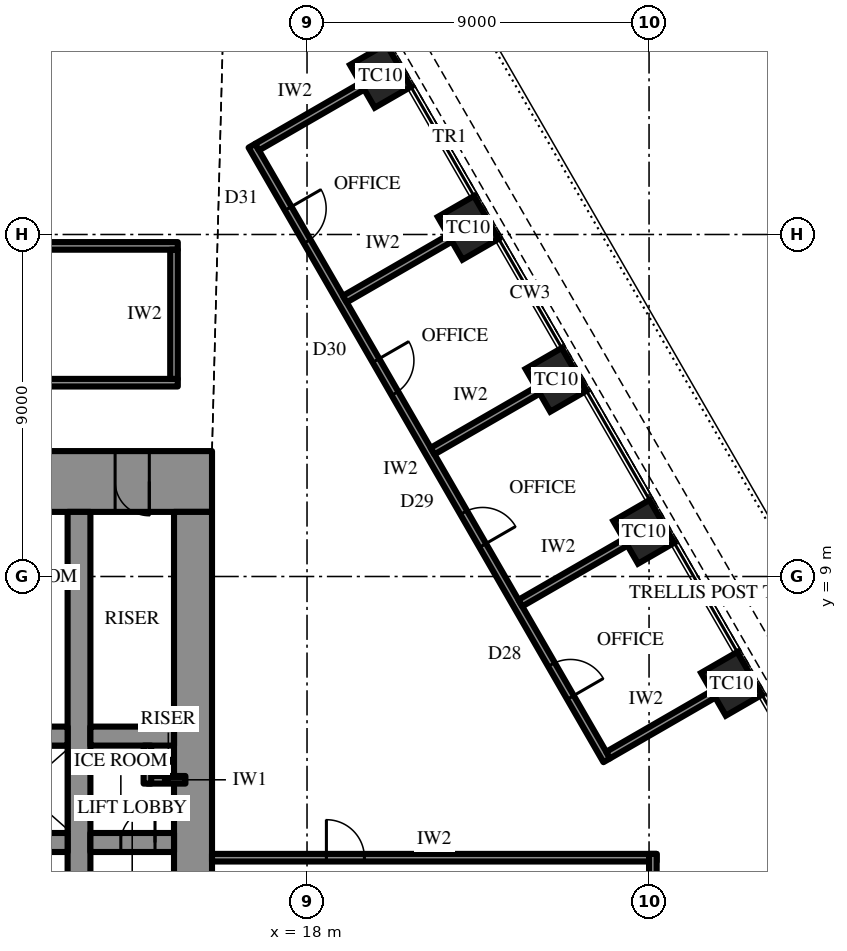
"""IFC4 building model, lengths in metres.
Left out: names, types, materials, properties, quantities, classifications, styles, units other than length and angle.
Written with IfcOpenShell. Run it as: python <this file> out.ifc"""

import sys

from ifc_helpers import new_model, si_unit, direction, frame, frame_2d, origin, origin_2d, place, context, subcontext, project, spatial, rectangle, extrude, element, fill, save


model = new_model("IFC4")
c1 = context("Model", 3, precision=1e-05, world=origin(), true_north=direction((0.0, 1.0)))
c2 = subcontext(c1, "Body", "Model", "MODEL_VIEW")
j1 = project(units=[si_unit("LENGTHUNIT", "METRE"), si_unit("PLANEANGLEUNIT", "RADIAN")], contexts=[c1])
p1 = place(None, origin())
s1 = spatial("IfcSite", under=j1, at=p1, CompositionType="ELEMENT")
p2 = place(p1, origin())
s2 = spatial("IfcBuilding", under=s1, at=p2, CompositionType="ELEMENT")
p3 = place(p2, frame((0.0, 0.0, 236.5)))
s3 = spatial("IfcBuildingStorey", under=s2, at=p3, CompositionType="ELEMENT", Elevation=236.5)
for number, where, z_axis, x_axis in (
    (1, (29.171, 6.175, 0.0), (0.0, 0.0, 1.0), (-0.5, 0.866, 0.0)),
    (2, (26.861, 10.175, 0.0), (0.0, 0.0, 1.0), (-0.5, 0.866, 0.0)),
    (3, (24.552, 14.175, 0.0), (0.0, 0.0, 1.0), (-0.5, 0.866, 0.0)),
    (4, (22.242, 18.175, 0.0), (0.0, 0.0, 1.0), (-0.5, 0.866, 0.0)),
    (5, (19.933, 22.175, 0.0), (0.0, 0.0, 1.0), (-0.5, 0.866, 0.0)),
):
    element("IfcColumn", number, at=place(p3, frame(where, z_axis=z_axis, x_axis=x_axis)), inside=s3, PredefinedType="COLUMN", context=c2, shape_type="SweptSolid", body=[
        extrude(rectangle(XDim=1.3, YDim=1.1, at=origin_2d()), origin(), (0.0, 0.0, 1.0), 4.2),
    ])
p4 = place(p3, frame((-15.5, 11.5, 0.0), z_axis=(0.0, 0.0, 1.0), x_axis=(1.0, 0.0, 0.0)))
e6 = element("IfcWall", 6, at=p4, inside=s3, PredefinedType="SHEAR", context=c2, shape_type="SweptSolid", body=[
    extrude(rectangle(XDim=31.0, YDim=1.6, at=frame_2d((15.5, 0.0))), origin(), (0.0, 0.0, 1.0), 4.2),
])
p5 = place(p4, frame((16.35, 0.0, 0.0)))
e7 = element("IfcOpeningElement", 7, at=p5, cuts=e6, PredefinedType="OPENING", context=c2, shape_type="SweptSolid", body=[
    extrude(rectangle(XDim=0.9, YDim=2.2, at=frame_2d((0.45, 1.1))), frame((0.0, 0.81, 0.0), z_axis=(0.0, -1.0, 0.0), x_axis=(1.0, 0.0, 0.0)), (0.0, 0.0, 1.0), 1.62),
])
p6 = place(p4, frame((19.35, 0.0, 0.0)))
e8 = element("IfcOpeningElement", 8, at=p6, cuts=e6, PredefinedType="OPENING", context=c2, shape_type="SweptSolid", body=[
    extrude(rectangle(XDim=0.9, YDim=2.2, at=frame_2d((0.45, 1.1))), frame((0.0, 0.81, 0.0), z_axis=(0.0, -1.0, 0.0), x_axis=(1.0, 0.0, 0.0)), (0.0, 0.0, 1.0), 1.62),
])
p7 = place(p4, frame((22.4, 0.0, 0.0)))
e9 = element("IfcOpeningElement", 9, at=p7, cuts=e6, PredefinedType="OPENING", context=c2, shape_type="SweptSolid", body=[
    extrude(rectangle(XDim=1.0, YDim=2.2, at=frame_2d((0.5, 1.1))), frame((0.0, 0.81, 0.0), z_axis=(0.0, -1.0, 0.0), x_axis=(1.0, 0.0, 0.0)), (0.0, 0.0, 1.0), 1.62),
])
p8 = place(p4, frame((1.65, 0.0, 0.0)))
e10 = element("IfcOpeningElement", 10, at=p8, cuts=e6, PredefinedType="OPENING", context=c2, shape_type="SweptSolid", body=[
    extrude(rectangle(XDim=0.9, YDim=2.2, at=frame_2d((0.45, 1.1))), frame((0.0, 0.81, 0.0), z_axis=(0.0, -1.0, 0.0), x_axis=(1.0, 0.0, 0.0)), (0.0, 0.0, 1.0), 1.62),
])
p9 = place(p4, frame((4.65, 0.0, 0.0)))
e11 = element("IfcOpeningElement", 11, at=p9, cuts=e6, PredefinedType="OPENING", context=c2, shape_type="SweptSolid", body=[
    extrude(rectangle(XDim=0.9, YDim=2.2, at=frame_2d((0.45, 1.1))), frame((0.0, 0.81, 0.0), z_axis=(0.0, -1.0, 0.0), x_axis=(1.0, 0.0, 0.0)), (0.0, 0.0, 1.0), 1.62),
])
p10 = place(p4, frame((25.45, 0.0, 0.0)))
e12 = element("IfcOpeningElement", 12, at=p10, cuts=e6, PredefinedType="OPENING", context=c2, shape_type="SweptSolid", body=[
    extrude(rectangle(XDim=0.9, YDim=2.2, at=frame_2d((0.45, 1.1))), frame((0.0, 0.81, 0.0), z_axis=(0.0, -1.0, 0.0), x_axis=(1.0, 0.0, 0.0)), (0.0, 0.0, 1.0), 1.62),
])
p11 = place(p4, frame((28.45, 0.0, 0.0)))
e13 = element("IfcOpeningElement", 13, at=p11, cuts=e6, PredefinedType="OPENING", context=c2, shape_type="SweptSolid", body=[
    extrude(rectangle(XDim=0.9, YDim=2.2, at=frame_2d((0.45, 1.1))), frame((0.0, 0.81, 0.0), z_axis=(0.0, -1.0, 0.0), x_axis=(1.0, 0.0, 0.0)), (0.0, 0.0, 1.0), 1.62),
])
p12 = place(p3, frame((15.0, -10.7, 0.0), z_axis=(0.0, 0.0, 1.0), x_axis=(0.0, 1.0, 0.0)))
e14 = element("IfcWall", 14, at=p12, inside=s3, PredefinedType="SHEAR", context=c2, shape_type="SweptSolid", body=[
    extrude(rectangle(XDim=21.4, YDim=1.0, at=frame_2d((10.7, 0.0))), origin(), (0.0, 0.0, 1.0), 4.2),
])
p13 = place(p12, frame((9.8, 0.0, 0.0)))
e15 = element("IfcOpeningElement", 15, at=p13, cuts=e14, PredefinedType="OPENING", context=c2, shape_type="SweptSolid", body=[
    extrude(rectangle(XDim=1.8, YDim=2.4, at=frame_2d((0.9, 1.2))), frame((0.0, 0.51, 0.0), z_axis=(0.0, -1.0, 0.0), x_axis=(1.0, 0.0, 0.0)), (0.0, 0.0, 1.0), 1.02),
])
p14 = place(p3, frame((12.0, -10.7, 0.0), z_axis=(0.0, 0.0, 1.0), x_axis=(0.0, 1.0, 0.0)))
e16 = element("IfcWall", 16, at=p14, inside=s3, PredefinedType="SHEAR", context=c2, shape_type="SweptSolid", body=[
    extrude(rectangle(XDim=21.4, YDim=0.6, at=frame_2d((10.7, 0.0))), origin(), (0.0, 0.0, 1.0), 4.2),
])
p15 = place(p14, frame((9.8, 0.0, 0.0)))
e17 = element("IfcOpeningElement", 17, at=p15, cuts=e16, PredefinedType="OPENING", context=c2, shape_type="SweptSolid", body=[
    extrude(rectangle(XDim=1.8, YDim=2.4, at=frame_2d((0.9, 1.2))), frame((0.0, 0.31, 0.0), z_axis=(0.0, -1.0, 0.0), x_axis=(1.0, 0.0, 0.0)), (0.0, 0.0, 1.0), 0.62),
])
p16 = place(p3, frame((-3.2, 2.0, 0.0), z_axis=(0.0, 0.0, 1.0), x_axis=(1.0, 0.0, 0.0)))
e18 = element("IfcWall", 18, at=p16, inside=s3, PredefinedType="SHEAR", context=c2, shape_type="SweptSolid", body=[
    extrude(rectangle(XDim=14.9, YDim=0.5, at=frame_2d((7.45, 0.0))), origin(), (0.0, 0.0, 1.0), 4.2),
])
p17 = place(p16, frame((1.15, 0.0, 0.0)))
e19 = element("IfcOpeningElement", 19, at=p17, cuts=e18, PredefinedType="OPENING", context=c2, shape_type="SweptSolid", body=[
    extrude(rectangle(XDim=1.1, YDim=2.2, at=frame_2d((0.55, 1.1))), frame((0.0, 0.26, 0.0), z_axis=(0.0, -1.0, 0.0), x_axis=(1.0, 0.0, 0.0)), (0.0, 0.0, 1.0), 0.52),
])
p18 = place(p16, frame((4.15, 0.0, 0.0)))
e20 = element("IfcOpeningElement", 20, at=p18, cuts=e18, PredefinedType="OPENING", context=c2, shape_type="SweptSolid", body=[
    extrude(rectangle(XDim=1.1, YDim=2.2, at=frame_2d((0.55, 1.1))), frame((0.0, 0.26, 0.0), z_axis=(0.0, -1.0, 0.0), x_axis=(1.0, 0.0, 0.0)), (0.0, 0.0, 1.0), 0.52),
])
p19 = place(p16, frame((7.15, 0.0, 0.0)))
e21 = element("IfcOpeningElement", 21, at=p19, cuts=e18, PredefinedType="OPENING", context=c2, shape_type="SweptSolid", body=[
    extrude(rectangle(XDim=1.1, YDim=2.2, at=frame_2d((0.55, 1.1))), frame((0.0, 0.26, 0.0), z_axis=(0.0, -1.0, 0.0), x_axis=(1.0, 0.0, 0.0)), (0.0, 0.0, 1.0), 0.52),
])
p20 = place(p16, frame((10.15, 0.0, 0.0)))
e22 = element("IfcOpeningElement", 22, at=p20, cuts=e18, PredefinedType="OPENING", context=c2, shape_type="SweptSolid", body=[
    extrude(rectangle(XDim=1.1, YDim=2.2, at=frame_2d((0.55, 1.1))), frame((0.0, 0.26, 0.0), z_axis=(0.0, -1.0, 0.0), x_axis=(1.0, 0.0, 0.0)), (0.0, 0.0, 1.0), 0.52),
])
p21 = place(p3, frame((12.3, 2.0, 0.0), z_axis=(0.0, 0.0, 1.0), x_axis=(1.0, 0.0, 0.0)))
e23 = element("IfcWall", 23, at=p21, inside=s3, PredefinedType="SHEAR", context=c2, shape_type="SweptSolid", body=[
    extrude(rectangle(XDim=2.2, YDim=0.5, at=frame_2d((1.1, 0.0))), origin(), (0.0, 0.0, 1.0), 4.2),
])
p22 = place(p21, frame((0.8, 0.0, 0.0)))
e24 = element("IfcOpeningElement", 24, at=p22, cuts=e23, PredefinedType="OPENING", context=c2, shape_type="SweptSolid", body=[
    extrude(rectangle(XDim=0.9, YDim=2.2, at=frame_2d((0.45, 1.1))), frame((0.0, 0.26, 0.0), z_axis=(0.0, -1.0, 0.0), x_axis=(1.0, 0.0, 0.0)), (0.0, 0.0, 1.0), 0.52),
])
p23 = place(p3, frame((-11.7, 4.8, 0.0), z_axis=(0.0, 0.0, 1.0), x_axis=(1.0, 0.0, 0.0)))
e25 = element("IfcWall", 25, at=p23, inside=s3, PredefinedType="SHEAR", context=c2, shape_type="SweptSolid", body=[
    extrude(rectangle(XDim=23.4, YDim=0.5, at=frame_2d((11.7, 0.0))), origin(), (0.0, 0.0, 1.0), 4.2),
])
p24 = place(p23, frame((6.6, 0.0, 0.0)))
e26 = element("IfcOpeningElement", 26, at=p24, cuts=e25, PredefinedType="OPENING", context=c2, shape_type="SweptSolid", body=[
    extrude(rectangle(XDim=1.2, YDim=2.2, at=frame_2d((0.6, 1.1))), frame((0.0, 0.26, 0.0), z_axis=(0.0, -1.0, 0.0), x_axis=(1.0, 0.0, 0.0)), (0.0, 0.0, 1.0), 0.52),
])
p25 = place(p23, frame((3.6, 0.0, 0.0)))
e27 = element("IfcOpeningElement", 27, at=p25, cuts=e25, PredefinedType="OPENING", context=c2, shape_type="SweptSolid", body=[
    extrude(rectangle(XDim=1.2, YDim=2.2, at=frame_2d((0.6, 1.1))), frame((0.0, 0.26, 0.0), z_axis=(0.0, -1.0, 0.0), x_axis=(1.0, 0.0, 0.0)), (0.0, 0.0, 1.0), 0.52),
])
p26 = place(p3, frame((12.3, 4.8, 0.0), z_axis=(0.0, 0.0, 1.0), x_axis=(1.0, 0.0, 0.0)))
e28 = element("IfcWall", 28, at=p26, inside=s3, PredefinedType="SHEAR", context=c2, shape_type="SweptSolid", body=[
    extrude(rectangle(XDim=2.2, YDim=0.5, at=frame_2d((1.1, 0.0))), origin(), (0.0, 0.0, 1.0), 4.2),
])
for number, where, z_axis, x_axis in (
    (29, (13.8, 3.65, 0.0), (0.0, 0.0, 1.0), (1.0, 0.0, 0.0)),
    (30, (13.8, 3.55, 0.0), (0.0, 0.0, 1.0), (0.0, 1.0, 0.0)),
):
    element("IfcWall", number, at=place(p3, frame(where, z_axis=z_axis, x_axis=x_axis)), inside=s3, PredefinedType="PARTITIONING", context=c2, shape_type="SweptSolid", body=[
        extrude(rectangle(XDim=1.0, YDim=0.2, at=frame_2d((0.5, 0.0))), origin(), (0.0, 0.0, 1.0), 4.0),
    ])
p27 = place(p3, frame((-14.6, 14.1, 0.0), z_axis=(0.0, 0.0, 1.0), x_axis=(1.0, 0.0, 0.0)))
e31 = element("IfcWall", 31, at=p27, inside=s3, PredefinedType="PARTITIONING", context=c2, shape_type="SweptSolid", body=[
    extrude(rectangle(XDim=29.2, YDim=0.2, at=frame_2d((14.6, 0.0))), origin(), (0.0, 0.0, 1.0), 4.0),
])
p28 = place(p3, frame((-14.6, 17.7, 0.0), z_axis=(0.0, 0.0, 1.0), x_axis=(1.0, 0.0, 0.0)))
e32 = element("IfcWall", 32, at=p28, inside=s3, PredefinedType="PARTITIONING", context=c2, shape_type="SweptSolid", body=[
    extrude(rectangle(XDim=29.2, YDim=0.2, at=frame_2d((14.6, 0.0))), origin(), (0.0, 0.0, 1.0), 4.0),
])
p29 = place(p28, frame((6.45, 0.0, 0.0)))
e33 = element("IfcOpeningElement", 33, at=p29, cuts=e32, PredefinedType="OPENING", context=c2, shape_type="SweptSolid", body=[
    extrude(rectangle(XDim=1.8, YDim=2.4, at=frame_2d((0.9, 1.2))), frame((0.0, 0.11, 0.0), z_axis=(0.0, -1.0, 0.0), x_axis=(1.0, 0.0, 0.0)), (0.0, 0.0, 1.0), 0.22),
])
p30 = place(p28, frame((20.95, 0.0, 0.0)))
e34 = element("IfcOpeningElement", 34, at=p30, cuts=e32, PredefinedType="OPENING", context=c2, shape_type="SweptSolid", body=[
    extrude(rectangle(XDim=1.8, YDim=2.4, at=frame_2d((0.9, 1.2))), frame((0.0, 0.11, 0.0), z_axis=(0.0, -1.0, 0.0), x_axis=(1.0, 0.0, 0.0)), (0.0, 0.0, 1.0), 0.22),
])
p31 = place(p3, frame((14.5, 14.2, 0.0), z_axis=(0.0, 0.0, 1.0), x_axis=(0.0, 1.0, 0.0)))
e35 = element("IfcWall", 35, at=p31, inside=s3, PredefinedType="PARTITIONING", context=c2, shape_type="SweptSolid", body=[
    extrude(rectangle(XDim=3.4, YDim=0.2, at=frame_2d((1.7, 0.0))), origin(), (0.0, 0.0, 1.0), 4.0),
])
p32 = place(p3, frame((25.886, 4.163, 0.0), z_axis=(0.0, 0.0, 1.0), x_axis=(-0.499998569178, 0.866026229868, 0.0)))
e36 = element("IfcWall", 36, at=p32, inside=s3, PredefinedType="PARTITIONING", context=c2, shape_type="SweptSolid", body=[
    extrude(rectangle(XDim=18.675, YDim=0.2, at=frame_2d((9.338, 0.0))), origin(), (0.0, 0.0, 1.0), 4.0),
])
p33 = place(p32, frame((1.909, 0.0, 0.0)))
e37 = element("IfcOpeningElement", 37, at=p33, cuts=e36, PredefinedType="OPENING", context=c2, shape_type="SweptSolid", body=[
    extrude(rectangle(XDim=1.0, YDim=2.2, at=frame_2d((0.5, 1.1))), frame((0.0, 0.11, 0.0), z_axis=(0.0, -1.0, 0.0), x_axis=(1.0, 0.0, 0.0)), (0.0, 0.0, 1.0), 0.22),
])
p34 = place(p32, frame((6.528, 0.0, 0.0)))
e38 = element("IfcOpeningElement", 38, at=p34, cuts=e36, PredefinedType="OPENING", context=c2, shape_type="SweptSolid", body=[
    extrude(rectangle(XDim=1.0, YDim=2.2, at=frame_2d((0.5, 1.1))), frame((0.0, 0.11, 0.0), z_axis=(0.0, -1.0, 0.0), x_axis=(1.0, 0.0, 0.0)), (0.0, 0.0, 1.0), 0.22),
])
p35 = place(p32, frame((11.147, 0.0, 0.0)))
e39 = element("IfcOpeningElement", 39, at=p35, cuts=e36, PredefinedType="OPENING", context=c2, shape_type="SweptSolid", body=[
    extrude(rectangle(XDim=1.0, YDim=2.2, at=frame_2d((0.5, 1.1))), frame((0.0, 0.11, 0.0), z_axis=(0.0, -1.0, 0.0), x_axis=(1.0, 0.0, 0.0)), (0.0, 0.0, 1.0), 0.22),
])
p36 = place(p32, frame((15.766, 0.0, 0.0)))
e40 = element("IfcOpeningElement", 40, at=p36, cuts=e36, PredefinedType="OPENING", context=c2, shape_type="SweptSolid", body=[
    extrude(rectangle(XDim=1.0, YDim=2.2, at=frame_2d((0.5, 1.1))), frame((0.0, 0.11, 0.0), z_axis=(0.0, -1.0, 0.0), x_axis=(1.0, 0.0, 0.0)), (0.0, 0.0, 1.0), 0.22),
])
p37 = place(p3, frame((25.923, 4.3, 0.0), z_axis=(0.0, 0.0, 1.0), x_axis=(0.866042017984, 0.499971222258, 0.0)))
e41 = element("IfcWall", 41, at=p37, inside=s3, PredefinedType="PARTITIONING", context=c2, shape_type="SweptSolid", body=[
    extrude(rectangle(XDim=3.2, YDim=0.2, at=frame_2d((1.6, 0.0))), origin(), (0.0, 0.0, 1.0), 3.082),
])
p38 = place(p3, frame((23.614, 8.3, 0.0), z_axis=(0.0, 0.0, 1.0), x_axis=(0.866061088033, 0.499938187974, 0.0)))
e42 = element("IfcWall", 42, at=p38, inside=s3, PredefinedType="PARTITIONING", context=c2, shape_type="SweptSolid", body=[
    extrude(rectangle(XDim=3.2, YDim=0.2, at=frame_2d((1.6, 0.0))), origin(), (0.0, 0.0, 1.0), 3.082),
])
for number, where, z_axis, x_axis in (
    (43, (21.304, 12.3, 0.0), (0.0, 0.0, 1.0), (0.866, 0.5, 0.0)),
    (44, (18.995, 16.3, 0.0), (0.0, 0.0, 1.0), (0.866, 0.5, 0.0)),
):
    element("IfcWall", number, at=place(p3, frame(where, z_axis=z_axis, x_axis=x_axis)), inside=s3, PredefinedType="PARTITIONING", context=c2, shape_type="SweptSolid", body=[
        extrude(rectangle(XDim=3.2, YDim=0.2, at=frame_2d((1.6, 0.0))), origin(), (0.0, 0.0, 1.0), 3.082),
    ])
p39 = place(p3, frame((16.685, 20.3, 0.0), z_axis=(0.0, 0.0, 1.0), x_axis=(0.866061088033, 0.499938187974, 0.0)))
e45 = element("IfcWall", 45, at=p39, inside=s3, PredefinedType="PARTITIONING", context=c2, shape_type="SweptSolid", body=[
    extrude(rectangle(XDim=3.2, YDim=0.2, at=frame_2d((1.6, 0.0))), origin(), (0.0, 0.0, 1.0), 3.082),
])
p40 = place(p3, frame((15.5, 1.6, 0.0), z_axis=(0.0, 0.0, 1.0), x_axis=(1.0, 0.0, 0.0)))
e46 = element("IfcWall", 46, at=p40, inside=s3, PredefinedType="PARTITIONING", context=c2, shape_type="SweptSolid", body=[
    extrude(rectangle(XDim=11.7, YDim=0.2, at=frame_2d((5.85, 0.0))), origin(), (0.0, 0.0, 1.0), 4.0),
])
p41 = place(p40, frame((3.01, 0.0, 0.0)))
e47 = element("IfcOpeningElement", 47, at=p41, cuts=e46, PredefinedType="OPENING", context=c2, shape_type="SweptSolid", body=[
    extrude(rectangle(XDim=1.0, YDim=2.2, at=frame_2d((0.5, 1.1))), frame((0.0, 0.11, 0.0), z_axis=(0.0, -1.0, 0.0), x_axis=(1.0, 0.0, 0.0)), (0.0, 0.0, 1.0), 0.22),
])
p42 = place(p3, frame((27.1, -1.7, 0.0), z_axis=(0.0, 0.0, 1.0), x_axis=(0.0, 1.0, 0.0)))
e48 = element("IfcWall", 48, at=p42, inside=s3, PredefinedType="PARTITIONING", context=c2, shape_type="SweptSolid", body=[
    extrude(rectangle(XDim=3.4, YDim=0.2, at=frame_2d((1.7, 0.0))), origin(), (0.0, 0.0, 1.0), 4.0),
])
p43 = place(p42, frame((1.2, 0.0, 0.0)))
e49 = element("IfcOpeningElement", 49, at=p43, cuts=e48, PredefinedType="OPENING", context=c2, shape_type="SweptSolid", body=[
    extrude(rectangle(XDim=1.0, YDim=2.2, at=frame_2d((0.5, 1.1))), frame((0.0, 0.11, 0.0), z_axis=(0.0, -1.0, 0.0), x_axis=(1.0, 0.0, 0.0)), (0.0, 0.0, 1.0), 0.22),
])
p44 = place(p11, frame((0.9, 0.0, 0.0), z_axis=(0.0, 0.0, 1.0), x_axis=(-1.0, 0.0, 0.0)))
e50 = element("IfcDoor", 50, at=p44, inside=s3, OperationType="SINGLE_SWING_RIGHT", PredefinedType="DOOR", context=c2, shape_type="SweptSolid", body=[
    extrude(rectangle(XDim=0.9, YDim=2.2, at=frame_2d((0.45, 1.1))), frame((0.0, 0.025, 0.0), z_axis=(0.0, -1.0, 0.0), x_axis=(1.0, 0.0, 0.0)), (0.0, 0.0, 1.0), 0.05),
])
fill(e13, e50)
p45 = place(p22, origin())
e51 = element("IfcDoor", 51, at=p45, inside=s3, OperationType="SINGLE_SWING_LEFT", PredefinedType="DOOR", context=c2, shape_type="SweptSolid", body=[
    extrude(rectangle(XDim=0.9, YDim=2.2, at=frame_2d((0.45, 1.1))), frame((0.0, 0.025, 0.0), z_axis=(0.0, -1.0, 0.0), x_axis=(1.0, 0.0, 0.0)), (0.0, 0.0, 1.0), 0.05),
])
fill(e24, e51)
p46 = place(p33, frame((1.0, 0.0, 0.0), z_axis=(0.0, 0.0, 1.0), x_axis=(-1.0, 0.0, 0.0)))
e52 = element("IfcDoor", 52, at=p46, inside=s3, OperationType="SINGLE_SWING_LEFT", PredefinedType="DOOR", context=c2, shape_type="SweptSolid", body=[
    extrude(rectangle(XDim=1.0, YDim=2.2, at=frame_2d((0.5, 1.1))), frame((0.0, 0.025, 0.0), z_axis=(0.0, -1.0, 0.0), x_axis=(1.0, 0.0, 0.0)), (0.0, 0.0, 1.0), 0.05),
])
fill(e37, e52)
p47 = place(p34, frame((1.0, 0.0, 0.0), z_axis=(0.0, 0.0, 1.0), x_axis=(-1.0, 0.0, 0.0)))
e53 = element("IfcDoor", 53, at=p47, inside=s3, OperationType="SINGLE_SWING_LEFT", PredefinedType="DOOR", context=c2, shape_type="SweptSolid", body=[
    extrude(rectangle(XDim=1.0, YDim=2.2, at=frame_2d((0.5, 1.1))), frame((0.0, 0.025, 0.0), z_axis=(0.0, -1.0, 0.0), x_axis=(1.0, 0.0, 0.0)), (0.0, 0.0, 1.0), 0.05),
])
fill(e38, e53)
p48 = place(p35, frame((1.0, 0.0, 0.0), z_axis=(0.0, 0.0, 1.0), x_axis=(-1.0, 0.0, 0.0)))
e54 = element("IfcDoor", 54, at=p48, inside=s3, OperationType="SINGLE_SWING_RIGHT", PredefinedType="DOOR", context=c2, shape_type="SweptSolid", body=[
    extrude(rectangle(XDim=1.0, YDim=2.2, at=frame_2d((0.5, 1.1))), frame((0.0, 0.025, 0.0), z_axis=(0.0, -1.0, 0.0), x_axis=(1.0, 0.0, 0.0)), (0.0, 0.0, 1.0), 0.05),
])
fill(e39, e54)
p49 = place(p36, frame((1.0, 0.0, 0.0), z_axis=(0.0, 0.0, 1.0), x_axis=(-1.0, 0.0, 0.0)))
e55 = element("IfcDoor", 55, at=p49, inside=s3, OperationType="SINGLE_SWING_RIGHT", PredefinedType="DOOR", context=c2, shape_type="SweptSolid", body=[
    extrude(rectangle(XDim=1.0, YDim=2.2, at=frame_2d((0.5, 1.1))), frame((0.0, 0.025, 0.0), z_axis=(0.0, -1.0, 0.0), x_axis=(1.0, 0.0, 0.0)), (0.0, 0.0, 1.0), 0.05),
])
fill(e40, e55)
p50 = place(p41, origin())
e56 = element("IfcDoor", 56, at=p50, inside=s3, OperationType="SINGLE_SWING_RIGHT", PredefinedType="DOOR", context=c2, shape_type="SweptSolid", body=[
    extrude(rectangle(XDim=1.0, YDim=2.2, at=frame_2d((0.5, 1.1))), frame((0.0, 0.025, 0.0), z_axis=(0.0, -1.0, 0.0), x_axis=(1.0, 0.0, 0.0)), (0.0, 0.0, 1.0), 0.05),
])
fill(e47, e56)
save(model, sys.argv[1])
